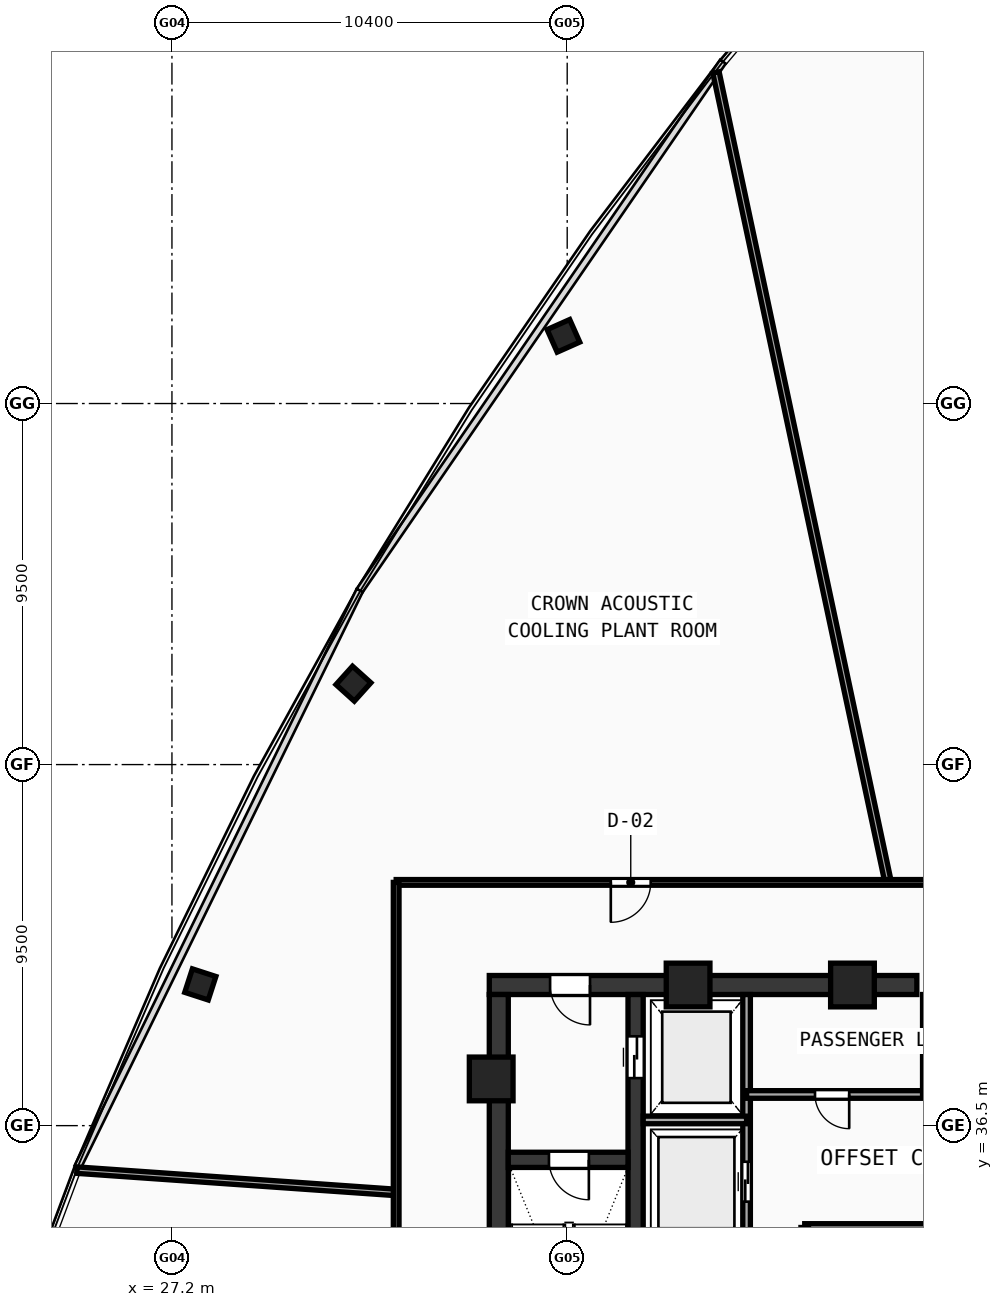
"""IFC4 building model, lengths in metres.
Left out: names, types, materials, properties, quantities, classifications, styles, units other than length and angle.
Written with IfcOpenShell. Run it as: python <this file> out.ifc"""

import sys

from ifc_helpers import new_model, si_unit, direction, frame, frame_2d, origin, origin_with_axes, origin_2d, place, context, subcontext, project, spatial, rectangle, hollow_rectangle, extrude, source, transform, mapped, element, fill, save


model = new_model("IFC4")
c1 = context("Model", 3, precision=1e-05, world=origin(), true_north=direction((0.0, 1.0)))
c2 = subcontext(c1, "Body", "Model", "MODEL_VIEW")
j1 = project(units=[si_unit("LENGTHUNIT", "METRE"), si_unit("PLANEANGLEUNIT", "RADIAN")], contexts=[c1])
p1 = place(None, origin())
s1 = spatial("IfcSite", under=j1, at=p1, CompositionType="ELEMENT")
p2 = place(p1, origin())
s2 = spatial("IfcBuilding", under=s1, at=p2, CompositionType="ELEMENT")
p3 = place(p2, frame((0.0, 0.0, 391.76)))
s3 = spatial("IfcBuildingStorey", under=s2, at=p3, CompositionType="ELEMENT", Elevation=391.76)
p4 = place(p3, frame((35.55, 40.2, 0.0), z_axis=(0.0, 0.0, 1.0), x_axis=(1.0, 0.0, 0.0)))
e1 = element("IfcWall", 1, at=p4, inside=s3, PredefinedType="SHEAR", context=c2, shape_type="SweptSolid", body=[
    extrude(rectangle(XDim=11.25, YDim=0.5, at=frame_2d((5.625, 0.0))), origin(), (0.0, 0.0, 1.0), 4.72),
])
p5 = place(p4, frame((1.6, 0.0, 0.0)))
e2 = element("IfcOpeningElement", 2, at=p5, cuts=e1, PredefinedType="OPENING", context=c2, shape_type="SweptSolid", body=[
    extrude(rectangle(XDim=1.05, YDim=2.1, at=frame_2d((0.525, 1.05))), frame((0.0, 0.26, 0.0), z_axis=(0.0, -1.0, 0.0), x_axis=(1.0, 0.0, 0.0)), (0.0, 0.0, 1.0), 0.52),
])
p6 = place(p3, frame((35.8, 27.75, 0.0), z_axis=(0.0, 0.0, 1.0), x_axis=(0.0, 1.0, 0.0)))
e3 = element("IfcWall", 3, at=p6, inside=s3, PredefinedType="SHEAR", context=c2, shape_type="SweptSolid", body=[
    extrude(rectangle(XDim=12.2, YDim=0.5, at=frame_2d((6.1, 0.0))), origin(), (0.0, 0.0, 1.0), 4.72),
])
p7 = place(p3, frame((39.4, 27.75, 0.0), z_axis=(0.0, 0.0, 1.0), x_axis=(0.0, 1.0, 0.0)))
e4 = element("IfcWall", 4, at=p7, inside=s3, PredefinedType="SHEAR", context=c2, shape_type="SweptSolid", body=[
    extrude(rectangle(XDim=12.2, YDim=0.4, at=frame_2d((6.1, 0.0))), origin(), (0.0, 0.0, 1.0), 4.72),
])
p8 = place(p7, frame((10.0, 0.0, 0.0)))
e5 = element("IfcOpeningElement", 5, at=p8, cuts=e4, PredefinedType="OPENING", context=c2, shape_type="SweptSolid", body=[
    extrude(rectangle(XDim=1.1, YDim=2.1, at=frame_2d((0.55, 1.05))), frame((0.0, 0.21, 0.0), z_axis=(0.0, -1.0, 0.0), x_axis=(1.0, 0.0, 0.0)), (0.0, 0.0, 1.0), 0.42),
])
p9 = place(p3, frame((36.05, 35.6, 0.0), z_axis=(0.0, 0.0, 1.0), x_axis=(1.0, 0.0, 0.0)))
e6 = element("IfcWall", 6, at=p9, inside=s3, PredefinedType="SHEAR", context=c2, shape_type="SweptSolid", body=[
    extrude(rectangle(XDim=3.15, YDim=0.4, at=frame_2d((1.575, 0.0))), origin(), (0.0, 0.0, 1.0), 4.72),
])
p10 = place(p9, frame((1.07, 0.0, 0.0)))
e7 = element("IfcOpeningElement", 7, at=p10, cuts=e6, PredefinedType="OPENING", context=c2, shape_type="SweptSolid", body=[
    extrude(rectangle(XDim=1.05, YDim=2.1, at=frame_2d((0.525, 1.05))), frame((0.0, 0.21, 0.0), z_axis=(0.0, -1.0, 0.0), x_axis=(1.0, 0.0, 0.0)), (0.0, 0.0, 1.0), 0.42),
])
m1 = source(origin(), c2, "Body", "SweptSolid", [
    extrude(hollow_rectangle(XDim=1.15, YDim=1.15, WallThickness=0.048, at=origin_2d()), origin(), (0.0, 0.0, 1.0), 5.0),
])
for number, where, z_axis, x_axis in (
    (8, (45.106, 40.2, -0.28), (0.0, 0.0, 1.0), (1.0, 0.0, 0.0)),
    (9, (40.781, 40.2, -0.28), (0.0, 0.0, 1.0), (1.0, 0.0, 0.0)),
    (10, (35.6, 37.729, -0.28), (0.0, 0.0, 1.0), (1.0, 0.0, 0.0)),
):
    element("IfcColumn", number, at=place(p3, frame(where, z_axis=z_axis, x_axis=x_axis)), inside=s3, PredefinedType="COLUMN", context=c2, shape_type="MappedRepresentation", body=[
        mapped(m1, transform((0.0, 0.0, 0.0), scale=1.0)),
    ])
m2 = source(origin(), c2, "Body", "SweptSolid", [
    extrude(hollow_rectangle(XDim=0.65, YDim=0.65, WallThickness=0.024, at=origin_2d()), origin(), (0.0, 0.0, 1.0), 5.0),
])
for number, where, z_axis, x_axis in (
    (11, (37.501, 57.281, -0.28), (0.0, 0.0, 1.0), (-0.914, -0.407, 0.0)),
    (12, (31.975, 48.129, -0.28), (0.0, 0.0, 1.0), (-0.669, -0.743, 0.0)),
    (13, (27.947, 40.216, -0.28), (0.0, 0.0, 1.0), (-0.309, -0.951, 0.0)),
):
    element("IfcColumn", number, at=place(p3, frame(where, z_axis=z_axis, x_axis=x_axis)), inside=s3, PredefinedType="COLUMN", context=c2, shape_type="MappedRepresentation", body=[
        mapped(m2, transform((0.0, 0.0, 0.0), scale=1.0)),
    ])
p11 = place(p3, frame((42.32, 33.5, 0.0), z_axis=(0.0, 0.0, 1.0), x_axis=(0.0, 1.0, 0.0)))
e14 = element("IfcWall", 14, at=p11, inside=s3, PredefinedType="SOLIDWALL", context=c2, shape_type="SweptSolid", body=[
    extrude(rectangle(XDim=6.45, YDim=0.2, at=frame_2d((3.225, 0.0))), origin(), (0.0, 0.0, 1.0), 4.72),
])
p12 = place(p11, frame((1.0, 0.0, 0.0)))
e15 = element("IfcOpeningElement", 15, at=p12, cuts=e14, PredefinedType="OPENING", context=c2, shape_type="SweptSolid", body=[
    extrude(rectangle(XDim=1.05, YDim=2.1, at=frame_2d((0.525, 1.05))), frame((0.0, 0.11, 0.0), z_axis=(0.0, -1.0, 0.0), x_axis=(1.0, 0.0, 0.0)), (0.0, 0.0, 1.0), 0.22),
])
p13 = place(p3, frame((39.6, 36.65, 0.0), z_axis=(0.0, 0.0, 1.0), x_axis=(1.0, 0.0, 0.0)))
e16 = element("IfcWall", 16, at=p13, inside=s3, PredefinedType="SOLIDWALL", context=c2, shape_type="SweptSolid", body=[
    extrude(rectangle(XDim=2.72, YDim=0.2, at=frame_2d((1.36, 0.0))), origin(), (0.0, 0.0, 1.0), 4.72),
])
p14 = place(p3, frame((42.32, 37.32, 0.0), z_axis=(0.0, 0.0, 1.0), x_axis=(1.0, 0.0, 0.0)))
e17 = element("IfcWall", 17, at=p14, inside=s3, PredefinedType="SOLIDWALL", context=c2, shape_type="SweptSolid", body=[
    extrude(rectangle(XDim=4.73, YDim=0.2, at=frame_2d((2.365, 0.0))), origin(), (0.0, 0.0, 1.0), 4.72),
])
p15 = place(p14, frame((1.8, 0.0, 0.0)))
e18 = element("IfcOpeningElement", 18, at=p15, cuts=e17, PredefinedType="OPENING", context=c2, shape_type="SweptSolid", body=[
    extrude(rectangle(XDim=0.9, YDim=2.1, at=frame_2d((0.45, 1.05))), frame((0.0, 0.11, 0.0), z_axis=(0.0, -1.0, 0.0), x_axis=(1.0, 0.0, 0.0)), (0.0, 0.0, 1.0), 0.22),
])
p16 = place(p3, frame((47.05, 37.32, 0.0), z_axis=(0.0, 0.0, 1.0), x_axis=(0.0, 1.0, 0.0)))
e19 = element("IfcWall", 19, at=p16, inside=s3, PredefinedType="SOLIDWALL", context=c2, shape_type="SweptSolid", body=[
    extrude(rectangle(XDim=2.63, YDim=0.2, at=frame_2d((1.315, 0.0))), origin(), (0.0, 0.0, 1.0), 4.72),
])
p17 = place(p3, frame((43.85, 33.82, 0.0), z_axis=(0.0, 0.0, 1.0), x_axis=(1.0, 0.0, 0.0)))
e20 = element("IfcWall", 20, at=p17, inside=s3, PredefinedType="SOLIDWALL", context=c2, shape_type="SweptSolid", body=[
    extrude(rectangle(XDim=9.83, YDim=0.2, at=frame_2d((4.915, 0.0))), origin(), (0.0, 0.0, 1.0), 4.72),
])
p18 = place(p17, frame((4.2, 0.0, 0.0)))
e21 = element("IfcOpeningElement", 21, at=p18, cuts=e20, PredefinedType="OPENING", context=c2, shape_type="SweptSolid", body=[
    extrude(rectangle(XDim=0.9, YDim=2.1, at=frame_2d((0.45, 1.05))), frame((0.0, 0.11, 0.0), z_axis=(0.0, -1.0, 0.0), x_axis=(1.0, 0.0, 0.0)), (0.0, 0.0, 1.0), 0.22),
])
p19 = place(p3, frame((43.85, 27.6, 0.0), z_axis=(0.0, 0.0, 1.0), x_axis=(0.0, 1.0, 0.0)))
e22 = element("IfcWall", 22, at=p19, inside=s3, PredefinedType="SOLIDWALL", context=c2, shape_type="SweptSolid", body=[
    extrude(rectangle(XDim=6.22, YDim=0.2, at=frame_2d((3.11, 0.0))), origin(), (0.0, 0.0, 1.0), 4.72),
])
p20 = place(p19, frame((2.25, 0.0, 0.0)))
e23 = element("IfcOpeningElement", 23, at=p20, cuts=e22, PredefinedType="OPENING", context=c2, shape_type="SweptSolid", body=[
    extrude(rectangle(XDim=1.05, YDim=2.1, at=frame_2d((0.525, 1.05))), frame((0.0, 0.11, 0.0), z_axis=(0.0, -1.0, 0.0), x_axis=(1.0, 0.0, 0.0)), (0.0, 0.0, 1.0), 0.22),
])
p21 = place(p3, frame((46.044, 42.9, 0.0), z_axis=(0.0, 0.0, 1.0), x_axis=(-0.207906465553, 0.978148711384, 0.0)))
e24 = element("IfcWall", 24, at=p21, inside=s3, PredefinedType="PARTITIONING", context=c2, shape_type="SweptSolid", body=[
    extrude(rectangle(XDim=21.788, YDim=0.17, at=frame_2d((10.894, 0.0))), origin(), (0.0, 0.0, 1.0), 4.12),
])
p22 = place(p3, frame((33.1, 34.742, 0.0), z_axis=(0.0, 0.0, 1.0), x_axis=(-0.997563993403, 0.069757286835, 0.0)))
e25 = element("IfcWall", 25, at=p22, inside=s3, PredefinedType="PARTITIONING", context=c2, shape_type="SweptSolid", body=[
    extrude(rectangle(XDim=8.421, YDim=0.17, at=frame_2d((4.21, 0.0))), origin(), (0.0, 0.0, 1.0), 4.12),
])
p23 = place(p3, frame((62.9, 42.9, 0.0), z_axis=(0.0, 0.0, 1.0), x_axis=(-1.0, 0.0, 0.0)))
e26 = element("IfcWall", 26, at=p23, inside=s3, PredefinedType="PARTITIONING", context=c2, shape_type="SweptSolid", body=[
    extrude(rectangle(XDim=29.8, YDim=0.15, at=frame_2d((14.9, 0.0))), origin(), (0.0, 0.0, 1.0), 4.12),
])
p24 = place(p23, frame((7.603, 0.0, 0.0)))
e27 = element("IfcOpeningElement", 27, at=p24, cuts=e26, PredefinedType="OPENING", context=c2, shape_type="SweptSolid", body=[
    extrude(rectangle(XDim=1.05, YDim=2.1, at=frame_2d((0.525, 1.05))), frame((0.0, 0.085, 0.0), z_axis=(0.0, -1.0, 0.0), x_axis=(1.0, 0.0, 0.0)), (0.0, 0.0, 1.0), 0.17),
])
p25 = place(p23, frame((23.103, 0.0, 0.0)))
e28 = element("IfcOpeningElement", 28, at=p25, cuts=e26, PredefinedType="OPENING", context=c2, shape_type="SweptSolid", body=[
    extrude(rectangle(XDim=1.05, YDim=2.1, at=frame_2d((0.525, 1.05))), frame((0.0, 0.085, 0.0), z_axis=(0.0, -1.0, 0.0), x_axis=(1.0, 0.0, 0.0)), (0.0, 0.0, 1.0), 0.17),
])
p26 = place(p3, frame((33.1, 42.9, 0.0), z_axis=(0.0, 0.0, 1.0), x_axis=(0.0, -1.0, 0.0)))
e29 = element("IfcWall", 29, at=p26, inside=s3, PredefinedType="PARTITIONING", context=c2, shape_type="SweptSolid", body=[
    extrude(rectangle(XDim=18.0, YDim=0.15, at=frame_2d((9.0, 0.0))), origin(), (0.0, 0.0, 1.0), 4.12),
])
m3 = source(origin(), c2, "Body", "SweptSolid", [
    extrude(rectangle(XDim=1.05, YDim=2.1, at=frame_2d((0.525, 1.05))), frame((0.0, 0.025, 0.0), z_axis=(0.0, -1.0, 0.0), x_axis=(1.0, 0.0, 0.0)), (0.0, 0.0, 1.0), 0.05),
])
p27 = place(p10, frame((1.05, 0.0, 0.0), z_axis=(0.0, 0.0, 1.0), x_axis=(-1.0, 0.0, 0.0)))
e30 = element("IfcDoor", 30, at=p27, inside=s3, OperationType="SINGLE_SWING_LEFT", PredefinedType="DOOR", context=c2, shape_type="MappedRepresentation", body=[
    mapped(m3, transform((0.0, 0.0, 0.0), scale=1.0)),
])
fill(e7, e30)
p28 = place(p5, frame((1.05, 0.0, 0.0), z_axis=(0.0, 0.0, 1.0), x_axis=(-1.0, 0.0, 0.0)))
e31 = element("IfcDoor", 31, at=p28, inside=s3, OperationType="SINGLE_SWING_LEFT", PredefinedType="DOOR", context=c2, shape_type="MappedRepresentation", body=[
    mapped(m3, transform((0.0, 0.0, 0.0), scale=1.0)),
])
fill(e2, e31)
m4 = source(origin(), c2, "Body", "SweptSolid", [
    extrude(rectangle(XDim=1.1, YDim=2.1, at=frame_2d((0.55, 1.05))), frame((0.0, 0.025, 0.0), z_axis=(0.0, -1.0, 0.0), x_axis=(1.0, 0.0, 0.0)), (0.0, 0.0, 1.0), 0.05),
])
p29 = place(p8, frame((1.1, 0.0, 0.0), z_axis=(0.0, 0.0, 1.0), x_axis=(-1.0, 0.0, 0.0)))
e32 = element("IfcDoor", 32, at=p29, inside=s3, OperationType="DOUBLE_DOOR_SLIDING", PredefinedType="DOOR", context=c2, shape_type="MappedRepresentation", body=[
    mapped(m4, transform((0.0, 0.0, 0.0), scale=1.0)),
])
fill(e5, e32)
p30 = place(p12, origin_with_axes())
e33 = element("IfcDoor", 33, at=p30, inside=s3, OperationType="DOUBLE_DOOR_SLIDING", PredefinedType="DOOR", context=c2, shape_type="MappedRepresentation", body=[
    mapped(m3, transform((0.0, 0.0, 0.0), scale=1.0)),
])
fill(e15, e33)
m5 = source(origin(), c2, "Body", "SweptSolid", [
    extrude(rectangle(XDim=0.9, YDim=2.1, at=frame_2d((0.45, 1.05))), frame((0.0, 0.025, 0.0), z_axis=(0.0, -1.0, 0.0), x_axis=(1.0, 0.0, 0.0)), (0.0, 0.0, 1.0), 0.05),
])
p31 = place(p15, frame((0.9, 0.0, 0.0), z_axis=(0.0, 0.0, 1.0), x_axis=(-1.0, 0.0, 0.0)))
e34 = element("IfcDoor", 34, at=p31, inside=s3, OperationType="SINGLE_SWING_LEFT", PredefinedType="DOOR", context=c2, shape_type="MappedRepresentation", body=[
    mapped(m5, transform((0.0, 0.0, 0.0), scale=1.0)),
])
fill(e18, e34)
p32 = place(p25, origin_with_axes())
e35 = element("IfcDoor", 35, at=p32, inside=s3, OperationType="SINGLE_SWING_RIGHT", PredefinedType="DOOR", context=c2, shape_type="MappedRepresentation", body=[
    mapped(m3, transform((0.0, 0.0, 0.0), scale=1.0)),
])
fill(e28, e35)
save(model, sys.argv[1])
